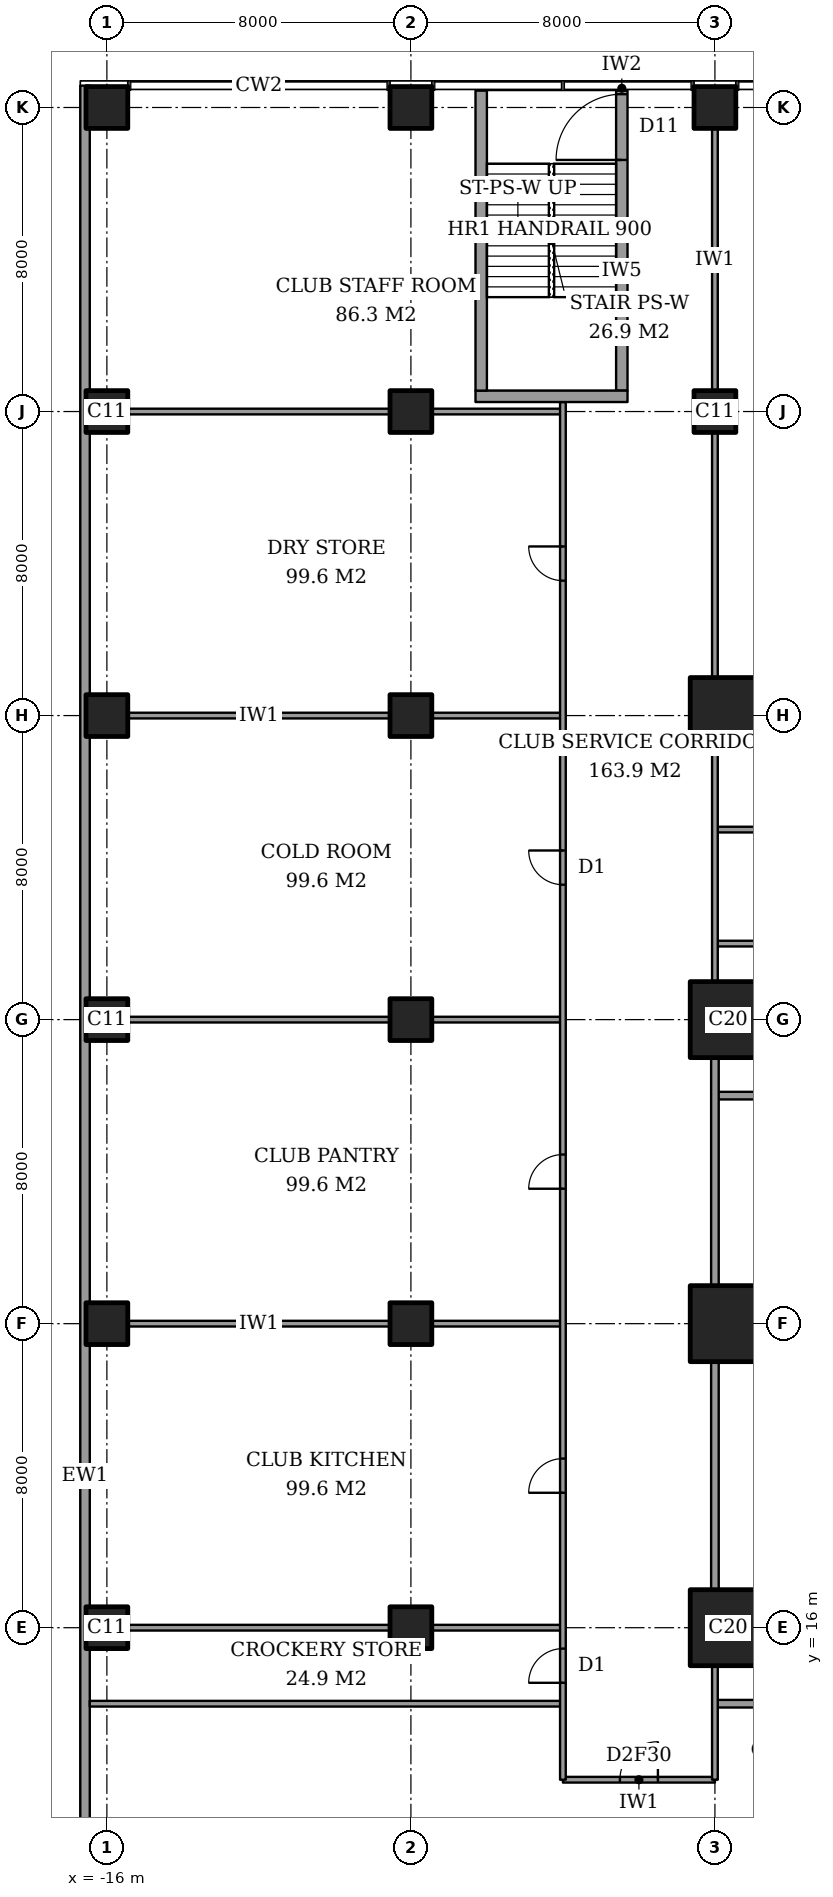
"""IFC4 building model, lengths in metres.
Left out: names, types, materials, properties, quantities, classifications, styles, units other than length and angle.
Written with IfcOpenShell. Run it as: python <this file> out.ifc"""

import sys

from ifc_helpers import new_model, si_unit, direction, frame, frame_2d, origin, origin_2d, place, context, subcontext, project, spatial, rectangle, extrude, element, fill, save


model = new_model("IFC4")
c1 = context("Model", 3, precision=1e-05, world=origin(), true_north=direction((0.0, 1.0)))
c2 = subcontext(c1, "Body", "Model", "MODEL_VIEW")
j1 = project(units=[si_unit("LENGTHUNIT", "METRE"), si_unit("PLANEANGLEUNIT", "RADIAN")], contexts=[c1])
p1 = place(None, origin())
s1 = spatial("IfcSite", under=j1, at=p1, CompositionType="ELEMENT")
p2 = place(p1, origin())
s2 = spatial("IfcBuilding", under=s1, at=p2, CompositionType="ELEMENT")
p3 = place(p2, frame((0.0, 0.0, 6.0)))
s3 = spatial("IfcBuildingStorey", under=s2, at=p3, CompositionType="ELEMENT", Elevation=6.0)
for number, where, z_axis, x_axis in (
    (1, (-16.0, 16.0, 0.0), (0.0, 0.0, 1.0), (1.0, 0.0, 0.0)),
    (2, (-16.0, 24.0, 0.0), (0.0, 0.0, 1.0), (1.0, 0.0, 0.0)),
    (3, (-16.0, 32.0, 0.0), (0.0, 0.0, 1.0), (1.0, 0.0, 0.0)),
    (4, (-16.0, 40.0, 0.0), (0.0, 0.0, 1.0), (1.0, 0.0, 0.0)),
    (5, (-16.0, 48.0, 0.0), (0.0, 0.0, 1.0), (1.0, 0.0, 0.0)),
    (6, (-16.0, 56.0, 0.0), (0.0, 0.0, 1.0), (1.0, 0.0, 0.0)),
    (7, (-8.0, 16.0, 0.0), (0.0, 0.0, 1.0), (1.0, 0.0, 0.0)),
    (8, (-8.0, 24.0, 0.0), (0.0, 0.0, 1.0), (1.0, 0.0, 0.0)),
    (9, (-8.0, 32.0, 0.0), (0.0, 0.0, 1.0), (1.0, 0.0, 0.0)),
    (10, (-8.0, 40.0, 0.0), (0.0, 0.0, 1.0), (1.0, 0.0, 0.0)),
    (11, (-8.0, 48.0, 0.0), (0.0, 0.0, 1.0), (1.0, 0.0, 0.0)),
    (12, (-8.0, 56.0, 0.0), (0.0, 0.0, 1.0), (1.0, 0.0, 0.0)),
):
    element("IfcColumn", number, at=place(p3, frame(where, z_axis=z_axis, x_axis=x_axis)), inside=s3, PredefinedType="COLUMN", context=c2, shape_type="SweptSolid", body=[
        extrude(rectangle(XDim=1.1, YDim=1.1, at=origin_2d()), origin(), (0.0, 0.0, 1.0), 5.0),
    ])
for number, where, z_axis, x_axis in (
    (13, (0.35, 16.0, 0.0), (0.0, 0.0, 1.0), (1.0, 0.0, 0.0)),
    (14, (0.35, 24.0, 0.0), (0.0, 0.0, 1.0), (1.0, 0.0, 0.0)),
    (15, (0.35, 32.0, 0.0), (0.0, 0.0, 1.0), (1.0, 0.0, 0.0)),
    (16, (0.35, 40.0, 0.0), (0.0, 0.0, 1.0), (1.0, 0.0, 0.0)),
):
    element("IfcColumn", number, at=place(p3, frame(where, z_axis=z_axis, x_axis=x_axis)), inside=s3, PredefinedType="COLUMN", context=c2, shape_type="SweptSolid", body=[
        extrude(rectangle(XDim=2.0, YDim=2.0, at=origin_2d()), origin(), (0.0, 0.0, 1.0), 5.0),
    ])
for number, where, z_axis, x_axis in (
    (17, (0.0, 48.0, 0.0), (0.0, 0.0, 1.0), (1.0, 0.0, 0.0)),
    (18, (0.0, 56.0, 0.0), (0.0, 0.0, 1.0), (1.0, 0.0, 0.0)),
):
    element("IfcColumn", number, at=place(p3, frame(where, z_axis=z_axis, x_axis=x_axis)), inside=s3, PredefinedType="COLUMN", context=c2, shape_type="SweptSolid", body=[
        extrude(rectangle(XDim=1.1, YDim=1.1, at=origin_2d()), origin(), (0.0, 0.0, 1.0), 5.0),
    ])
p4 = place(p3, frame((-16.575, 56.575, 0.0), z_axis=(0.0, 0.0, 1.0), x_axis=(0.0, -1.0, 0.0)))
e19 = element("IfcWall", 19, at=p4, inside=s3, PredefinedType="SOLIDWALL", context=c2, shape_type="SweptSolid", body=[
    extrude(rectangle(XDim=73.15, YDim=0.25, at=frame_2d((36.575, 0.0))), origin(), (0.0, 0.0, 1.0), 5.0),
])
p5 = place(p3, frame((-4.0, 12.0, 0.0), z_axis=(0.0, 0.0, 1.0), x_axis=(1.0, 0.0, 0.0)))
e20 = element("IfcWall", 20, at=p5, inside=s3, PredefinedType="PARTITIONING", context=c2, shape_type="SweptSolid", body=[
    extrude(rectangle(XDim=4.0, YDim=0.15, at=frame_2d((2.0, 0.0))), origin(), (0.0, 0.0, 1.0), 4.7),
])
p6 = place(p5, frame((1.5, 0.0, 0.0)))
e21 = element("IfcOpeningElement", 21, at=p6, cuts=e20, PredefinedType="OPENING", context=c2, shape_type="SweptSolid", body=[
    extrude(rectangle(XDim=1.0, YDim=2.1, at=frame_2d((0.5, 1.05))), frame((0.0, 0.085, 0.0), z_axis=(0.0, -1.0, 0.0), x_axis=(1.0, 0.0, 0.0)), (0.0, 0.0, 1.0), 0.17),
])
p7 = place(p3, frame((0.0, 14.0, 0.0), z_axis=(0.0, 0.0, 1.0), x_axis=(1.0, 0.0, 0.0)))
e22 = element("IfcWall", 22, at=p7, inside=s3, PredefinedType="PARTITIONING", context=c2, shape_type="SweptSolid", body=[
    extrude(rectangle(XDim=6.5, YDim=0.2, at=frame_2d((3.25, 0.0))), origin(), (0.0, 0.0, 1.0), 4.7),
])
p8 = place(p3, frame((-16.45, 14.0, 0.0), z_axis=(0.0, 0.0, 1.0), x_axis=(1.0, 0.0, 0.0)))
e23 = element("IfcWall", 23, at=p8, inside=s3, PredefinedType="PARTITIONING", context=c2, shape_type="SweptSolid", body=[
    extrude(rectangle(XDim=12.45, YDim=0.15, at=frame_2d((6.225, 0.0))), origin(), (0.0, 0.0, 1.0), 4.7),
])
p9 = place(p3, frame((-15.45, 16.0, 0.0), z_axis=(0.0, 0.0, 1.0), x_axis=(1.0, 0.0, 0.0)))
e24 = element("IfcWall", 24, at=p9, inside=s3, PredefinedType="PARTITIONING", context=c2, shape_type="SweptSolid", body=[
    extrude(rectangle(XDim=6.9, YDim=0.15, at=frame_2d((3.45, 0.0))), origin(), (0.0, 0.0, 1.0), 3.3),
])
p10 = place(p3, frame((-7.45, 16.0, 0.0), z_axis=(0.0, 0.0, 1.0), x_axis=(1.0, 0.0, 0.0)))
e25 = element("IfcWall", 25, at=p10, inside=s3, PredefinedType="PARTITIONING", context=c2, shape_type="SweptSolid", body=[
    extrude(rectangle(XDim=3.45, YDim=0.15, at=frame_2d((1.725, 0.0))), origin(), (0.0, 0.0, 1.0), 3.3),
])
p11 = place(p3, frame((-15.45, 24.0, 0.0), z_axis=(0.0, 0.0, 1.0), x_axis=(1.0, 0.0, 0.0)))
e26 = element("IfcWall", 26, at=p11, inside=s3, PredefinedType="PARTITIONING", context=c2, shape_type="SweptSolid", body=[
    extrude(rectangle(XDim=6.9, YDim=0.15, at=frame_2d((3.45, 0.0))), origin(), (0.0, 0.0, 1.0), 3.3),
])
p12 = place(p3, frame((-7.45, 24.0, 0.0), z_axis=(0.0, 0.0, 1.0), x_axis=(1.0, 0.0, 0.0)))
e27 = element("IfcWall", 27, at=p12, inside=s3, PredefinedType="PARTITIONING", context=c2, shape_type="SweptSolid", body=[
    extrude(rectangle(XDim=3.45, YDim=0.15, at=frame_2d((1.725, 0.0))), origin(), (0.0, 0.0, 1.0), 3.3),
])
p13 = place(p3, frame((0.0, 30.0, 0.0), z_axis=(0.0, 0.0, 1.0), x_axis=(1.0, 0.0, 0.0)))
e28 = element("IfcWall", 28, at=p13, inside=s3, PredefinedType="PARTITIONING", context=c2, shape_type="SweptSolid", body=[
    extrude(rectangle(XDim=6.0, YDim=0.2, at=frame_2d((3.0, 0.0))), origin(), (0.0, 0.0, 1.0), 4.7),
])
p14 = place(p3, frame((-15.45, 32.0, 0.0), z_axis=(0.0, 0.0, 1.0), x_axis=(1.0, 0.0, 0.0)))
e29 = element("IfcWall", 29, at=p14, inside=s3, PredefinedType="PARTITIONING", context=c2, shape_type="SweptSolid", body=[
    extrude(rectangle(XDim=6.9, YDim=0.15, at=frame_2d((3.45, 0.0))), origin(), (0.0, 0.0, 1.0), 3.3),
])
p15 = place(p3, frame((-7.45, 32.0, 0.0), z_axis=(0.0, 0.0, 1.0), x_axis=(1.0, 0.0, 0.0)))
e30 = element("IfcWall", 30, at=p15, inside=s3, PredefinedType="PARTITIONING", context=c2, shape_type="SweptSolid", body=[
    extrude(rectangle(XDim=3.45, YDim=0.15, at=frame_2d((1.725, 0.0))), origin(), (0.0, 0.0, 1.0), 3.3),
])
p16 = place(p3, frame((0.0, 34.0, 0.0), z_axis=(0.0, 0.0, 1.0), x_axis=(1.0, 0.0, 0.0)))
e31 = element("IfcWall", 31, at=p16, inside=s3, PredefinedType="PARTITIONING", context=c2, shape_type="SweptSolid", body=[
    extrude(rectangle(XDim=24.0, YDim=0.15, at=frame_2d((12.0, 0.0))), origin(), (0.0, 0.0, 1.0), 4.7),
])
p17 = place(p16, frame((11.95, 0.0, 0.0)))
e32 = element("IfcOpeningElement", 32, at=p17, cuts=e31, PredefinedType="OPENING", context=c2, shape_type="SweptSolid", body=[
    extrude(rectangle(XDim=1.0, YDim=2.1, at=frame_2d((0.5, 1.05))), frame((0.0, 0.085, 0.0), z_axis=(0.0, -1.0, 0.0), x_axis=(1.0, 0.0, 0.0)), (0.0, 0.0, 1.0), 0.17),
])
p18 = place(p16, frame((2.55, 0.0, 0.0)))
e33 = element("IfcOpeningElement", 33, at=p18, cuts=e31, PredefinedType="OPENING", context=c2, shape_type="SweptSolid", body=[
    extrude(rectangle(XDim=0.9, YDim=2.1, at=frame_2d((0.45, 1.05))), frame((0.0, 0.085, 0.0), z_axis=(0.0, -1.0, 0.0), x_axis=(1.0, 0.0, 0.0)), (0.0, 0.0, 1.0), 0.17),
])
p19 = place(p3, frame((0.0, 37.0, 0.0), z_axis=(0.0, 0.0, 1.0), x_axis=(1.0, 0.0, 0.0)))
e34 = element("IfcWall", 34, at=p19, inside=s3, PredefinedType="PARTITIONING", context=c2, shape_type="SweptSolid", body=[
    extrude(rectangle(XDim=24.45, YDim=0.15, at=frame_2d((12.225, 0.0))), origin(), (0.0, 0.0, 1.0), 4.7),
])
p20 = place(p19, frame((4.1, 0.0, 0.0)))
e35 = element("IfcOpeningElement", 35, at=p20, cuts=e34, PredefinedType="OPENING", context=c2, shape_type="SweptSolid", body=[
    extrude(rectangle(XDim=1.8, YDim=2.1, at=frame_2d((0.9, 1.05))), frame((0.0, 0.085, 0.0), z_axis=(0.0, -1.0, 0.0), x_axis=(1.0, 0.0, 0.0)), (0.0, 0.0, 1.0), 0.17),
])
p21 = place(p19, frame((12.6, 0.0, 0.0)))
e36 = element("IfcOpeningElement", 36, at=p21, cuts=e34, PredefinedType="OPENING", context=c2, shape_type="SweptSolid", body=[
    extrude(rectangle(XDim=1.8, YDim=2.1, at=frame_2d((0.9, 1.05))), frame((0.0, 0.085, 0.0), z_axis=(0.0, -1.0, 0.0), x_axis=(1.0, 0.0, 0.0)), (0.0, 0.0, 1.0), 0.17),
])
p22 = place(p19, frame((18.825, 0.0, 0.0)))
e37 = element("IfcOpeningElement", 37, at=p22, cuts=e34, PredefinedType="OPENING", context=c2, shape_type="SweptSolid", body=[
    extrude(rectangle(XDim=1.8, YDim=2.1, at=frame_2d((0.9, 1.05))), frame((0.0, 0.085, 0.0), z_axis=(0.0, -1.0, 0.0), x_axis=(1.0, 0.0, 0.0)), (0.0, 0.0, 1.0), 0.17),
])
p23 = place(p3, frame((-15.45, 40.0, 0.0), z_axis=(0.0, 0.0, 1.0), x_axis=(1.0, 0.0, 0.0)))
e38 = element("IfcWall", 38, at=p23, inside=s3, PredefinedType="PARTITIONING", context=c2, shape_type="SweptSolid", body=[
    extrude(rectangle(XDim=6.9, YDim=0.15, at=frame_2d((3.45, 0.0))), origin(), (0.0, 0.0, 1.0), 3.3),
])
p24 = place(p3, frame((-7.45, 40.0, 0.0), z_axis=(0.0, 0.0, 1.0), x_axis=(1.0, 0.0, 0.0)))
e39 = element("IfcWall", 39, at=p24, inside=s3, PredefinedType="PARTITIONING", context=c2, shape_type="SweptSolid", body=[
    extrude(rectangle(XDim=3.45, YDim=0.15, at=frame_2d((1.725, 0.0))), origin(), (0.0, 0.0, 1.0), 3.3),
])
p25 = place(p3, frame((-15.45, 48.0, 0.0), z_axis=(0.0, 0.0, 1.0), x_axis=(1.0, 0.0, 0.0)))
e40 = element("IfcWall", 40, at=p25, inside=s3, PredefinedType="PARTITIONING", context=c2, shape_type="SweptSolid", body=[
    extrude(rectangle(XDim=6.9, YDim=0.15, at=frame_2d((3.45, 0.0))), origin(), (0.0, 0.0, 1.0), 3.3),
])
p26 = place(p3, frame((-7.45, 48.0, 0.0), z_axis=(0.0, 0.0, 1.0), x_axis=(1.0, 0.0, 0.0)))
e41 = element("IfcWall", 41, at=p26, inside=s3, PredefinedType="PARTITIONING", context=c2, shape_type="SweptSolid", body=[
    extrude(rectangle(XDim=3.45, YDim=0.15, at=frame_2d((1.725, 0.0))), origin(), (0.0, 0.0, 1.0), 4.7),
])
p27 = place(p3, frame((-4.0, 12.0, 0.0), z_axis=(0.0, 0.0, 1.0), x_axis=(0.0, 1.0, 0.0)))
e42 = element("IfcWall", 42, at=p27, inside=s3, PredefinedType="PARTITIONING", context=c2, shape_type="SweptSolid", body=[
    extrude(rectangle(XDim=36.25, YDim=0.15, at=frame_2d((18.125, 0.0))), origin(), (0.0, 0.0, 1.0), 4.7),
])
p28 = place(p27, frame((2.55, 0.0, 0.0)))
e43 = element("IfcOpeningElement", 43, at=p28, cuts=e42, PredefinedType="OPENING", context=c2, shape_type="SweptSolid", body=[
    extrude(rectangle(XDim=0.9, YDim=2.1, at=frame_2d((0.45, 1.05))), frame((0.0, 0.085, 0.0), z_axis=(0.0, -1.0, 0.0), x_axis=(1.0, 0.0, 0.0)), (0.0, 0.0, 1.0), 0.17),
])
p29 = place(p27, frame((7.55, 0.0, 0.0)))
e44 = element("IfcOpeningElement", 44, at=p29, cuts=e42, PredefinedType="OPENING", context=c2, shape_type="SweptSolid", body=[
    extrude(rectangle(XDim=0.9, YDim=2.1, at=frame_2d((0.45, 1.05))), frame((0.0, 0.085, 0.0), z_axis=(0.0, -1.0, 0.0), x_axis=(1.0, 0.0, 0.0)), (0.0, 0.0, 1.0), 0.17),
])
p30 = place(p27, frame((15.55, 0.0, 0.0)))
e45 = element("IfcOpeningElement", 45, at=p30, cuts=e42, PredefinedType="OPENING", context=c2, shape_type="SweptSolid", body=[
    extrude(rectangle(XDim=0.9, YDim=2.1, at=frame_2d((0.45, 1.05))), frame((0.0, 0.085, 0.0), z_axis=(0.0, -1.0, 0.0), x_axis=(1.0, 0.0, 0.0)), (0.0, 0.0, 1.0), 0.17),
])
p31 = place(p27, frame((23.55, 0.0, 0.0)))
e46 = element("IfcOpeningElement", 46, at=p31, cuts=e42, PredefinedType="OPENING", context=c2, shape_type="SweptSolid", body=[
    extrude(rectangle(XDim=0.9, YDim=2.1, at=frame_2d((0.45, 1.05))), frame((0.0, 0.085, 0.0), z_axis=(0.0, -1.0, 0.0), x_axis=(1.0, 0.0, 0.0)), (0.0, 0.0, 1.0), 0.17),
])
p32 = place(p27, frame((31.55, 0.0, 0.0)))
e47 = element("IfcOpeningElement", 47, at=p32, cuts=e42, PredefinedType="OPENING", context=c2, shape_type="SweptSolid", body=[
    extrude(rectangle(XDim=0.9, YDim=2.1, at=frame_2d((0.45, 1.05))), frame((0.0, 0.085, 0.0), z_axis=(0.0, -1.0, 0.0), x_axis=(1.0, 0.0, 0.0)), (0.0, 0.0, 1.0), 0.17),
])
for number, where, z_axis, x_axis in (
    (48, (0.0, 17.0, 0.0), (0.0, 0.0, 1.0), (0.0, 1.0, 0.0)),
    (49, (0.0, 25.0, 0.0), (0.0, 0.0, 1.0), (0.0, 1.0, 0.0)),
):
    element("IfcWall", number, at=place(p3, frame(where, z_axis=z_axis, x_axis=x_axis)), inside=s3, PredefinedType="PARTITIONING", context=c2, shape_type="SweptSolid", body=[
        extrude(rectangle(XDim=6.0, YDim=0.2, at=frame_2d((3.0, 0.0))), origin(), (0.0, 0.0, 1.0), 3.3),
    ])
p33 = place(p3, frame((0.0, 12.0, 0.0), z_axis=(0.0, 0.0, 1.0), x_axis=(0.0, 1.0, 0.0)))
e50 = element("IfcWall", 50, at=p33, inside=s3, PredefinedType="PARTITIONING", context=c2, shape_type="SweptSolid", body=[
    extrude(rectangle(XDim=3.0, YDim=0.15, at=frame_2d((1.5, 0.0))), origin(), (0.0, 0.0, 1.0), 3.3),
])
p34 = place(p3, frame((0.0, 33.0, 0.0), z_axis=(0.0, 0.0, 1.0), x_axis=(0.0, 1.0, 0.0)))
e51 = element("IfcWall", 51, at=p34, inside=s3, PredefinedType="PARTITIONING", context=c2, shape_type="SweptSolid", body=[
    extrude(rectangle(XDim=6.0, YDim=0.15, at=frame_2d((3.0, 0.0))), origin(), (0.0, 0.0, 1.0), 3.3),
])
p35 = place(p3, frame((0.0, 41.0, 0.0), z_axis=(0.0, 0.0, 1.0), x_axis=(0.0, 1.0, 0.0)))
e52 = element("IfcWall", 52, at=p35, inside=s3, PredefinedType="PARTITIONING", context=c2, shape_type="SweptSolid", body=[
    extrude(rectangle(XDim=6.45, YDim=0.15, at=frame_2d((3.225, 0.0))), origin(), (0.0, 0.0, 1.0), 3.3),
])
p36 = place(p3, frame((0.0, 48.55, 0.0), z_axis=(0.0, 0.0, 1.0), x_axis=(0.0, 1.0, 0.0)))
e53 = element("IfcWall", 53, at=p36, inside=s3, PredefinedType="PARTITIONING", context=c2, shape_type="SweptSolid", body=[
    extrude(rectangle(XDim=6.9, YDim=0.15, at=frame_2d((3.45, 0.0))), origin(), (0.0, 0.0, 1.0), 3.3),
])
p37 = place(p3, frame((-6.3, 48.4, 0.0), z_axis=(0.0, 0.0, 1.0), x_axis=(1.0, 0.0, 0.0)))
e54 = element("IfcWall", 54, at=p37, inside=s3, PredefinedType="PARTITIONING", context=c2, shape_type="SweptSolid", body=[
    extrude(rectangle(XDim=4.0, YDim=0.3, at=frame_2d((2.0, 0.0))), origin(), (0.0, 0.0, 1.0), 5.0),
])
p38 = place(p3, frame((-6.15, 48.55, 0.0), z_axis=(0.0, 0.0, 1.0), x_axis=(0.0, 1.0, 0.0)))
e55 = element("IfcWall", 55, at=p38, inside=s3, PredefinedType="PARTITIONING", context=c2, shape_type="SweptSolid", body=[
    extrude(rectangle(XDim=7.9, YDim=0.3, at=frame_2d((3.95, 0.0))), origin(), (0.0, 0.0, 1.0), 5.0),
])
p39 = place(p3, frame((-2.45, 48.55, 0.0), z_axis=(0.0, 0.0, 1.0), x_axis=(0.0, 1.0, 0.0)))
e56 = element("IfcWall", 56, at=p39, inside=s3, PredefinedType="PARTITIONING", context=c2, shape_type="SweptSolid", body=[
    extrude(rectangle(XDim=7.9, YDim=0.3, at=frame_2d((3.95, 0.0))), origin(), (0.0, 0.0, 1.0), 5.0),
])
p40 = place(p39, frame((6.07, 0.0, 0.0)))
e57 = element("IfcOpeningElement", 57, at=p40, cuts=e56, PredefinedType="OPENING", context=c2, shape_type="SweptSolid", body=[
    extrude(rectangle(XDim=1.73, YDim=2.1, at=frame_2d((0.865, 1.05))), frame((0.0, 0.16, 0.0), z_axis=(0.0, -1.0, 0.0), x_axis=(1.0, 0.0, 0.0)), (0.0, 0.0, 1.0), 0.32),
])
for number, where, z_axis, x_axis in (
    (58, (-6.15, 56.45, 0.0), (0.0, 0.0, 1.0), (0.0, 1.0, 0.0)),
    (59, (-2.45, 56.45, 0.0), (0.0, 0.0, 1.0), (0.0, 1.0, 0.0)),
):
    element("IfcWall", number, at=place(p3, frame(where, z_axis=z_axis, x_axis=x_axis)), inside=s3, PredefinedType="PARTITIONING", context=c2, shape_type="SweptSolid", body=[
        extrude(rectangle(XDim=0.111, YDim=0.2, at=frame_2d((0.056, 0.0))), origin(), (0.0, 0.0, 1.0), 5.0),
    ])
p41 = place(p6, origin())
e60 = element("IfcDoor", 60, at=p41, inside=s3, OperationType="SINGLE_SWING_LEFT", PredefinedType="DOOR", context=c2, shape_type="SweptSolid", body=[
    extrude(rectangle(XDim=1.0, YDim=2.1, at=frame_2d((0.5, 1.05))), frame((0.0, 0.025, 0.0), z_axis=(0.0, -1.0, 0.0), x_axis=(1.0, 0.0, 0.0)), (0.0, 0.0, 1.0), 0.05),
])
fill(e21, e60)
p42 = place(p28, origin())
e61 = element("IfcDoor", 61, at=p42, inside=s3, OperationType="SINGLE_SWING_RIGHT", PredefinedType="DOOR", context=c2, shape_type="SweptSolid", body=[
    extrude(rectangle(XDim=0.9, YDim=2.1, at=frame_2d((0.45, 1.05))), frame((0.0, 0.025, 0.0), z_axis=(0.0, -1.0, 0.0), x_axis=(1.0, 0.0, 0.0)), (0.0, 0.0, 1.0), 0.05),
])
fill(e43, e61)
p43 = place(p29, origin())
e62 = element("IfcDoor", 62, at=p43, inside=s3, OperationType="SINGLE_SWING_RIGHT", PredefinedType="DOOR", context=c2, shape_type="SweptSolid", body=[
    extrude(rectangle(XDim=0.9, YDim=2.1, at=frame_2d((0.45, 1.05))), frame((0.0, 0.025, 0.0), z_axis=(0.0, -1.0, 0.0), x_axis=(1.0, 0.0, 0.0)), (0.0, 0.0, 1.0), 0.05),
])
fill(e44, e62)
p44 = place(p30, origin())
e63 = element("IfcDoor", 63, at=p44, inside=s3, OperationType="SINGLE_SWING_RIGHT", PredefinedType="DOOR", context=c2, shape_type="SweptSolid", body=[
    extrude(rectangle(XDim=0.9, YDim=2.1, at=frame_2d((0.45, 1.05))), frame((0.0, 0.025, 0.0), z_axis=(0.0, -1.0, 0.0), x_axis=(1.0, 0.0, 0.0)), (0.0, 0.0, 1.0), 0.05),
])
fill(e45, e63)
p45 = place(p31, origin())
e64 = element("IfcDoor", 64, at=p45, inside=s3, OperationType="SINGLE_SWING_LEFT", PredefinedType="DOOR", context=c2, shape_type="SweptSolid", body=[
    extrude(rectangle(XDim=0.9, YDim=2.1, at=frame_2d((0.45, 1.05))), frame((0.0, 0.025, 0.0), z_axis=(0.0, -1.0, 0.0), x_axis=(1.0, 0.0, 0.0)), (0.0, 0.0, 1.0), 0.05),
])
fill(e46, e64)
p46 = place(p32, origin())
e65 = element("IfcDoor", 65, at=p46, inside=s3, OperationType="SINGLE_SWING_LEFT", PredefinedType="DOOR", context=c2, shape_type="SweptSolid", body=[
    extrude(rectangle(XDim=0.9, YDim=2.1, at=frame_2d((0.45, 1.05))), frame((0.0, 0.025, 0.0), z_axis=(0.0, -1.0, 0.0), x_axis=(1.0, 0.0, 0.0)), (0.0, 0.0, 1.0), 0.05),
])
fill(e47, e65)
p47 = place(p40, origin())
e66 = element("IfcDoor", 66, at=p47, inside=s3, OperationType="DOUBLE_DOOR_SINGLE_SWING", PredefinedType="DOOR", context=c2, shape_type="SweptSolid", body=[
    extrude(rectangle(XDim=1.73, YDim=2.1, at=frame_2d((0.865, 1.05))), frame((0.0, 0.025, 0.0), z_axis=(0.0, -1.0, 0.0), x_axis=(1.0, 0.0, 0.0)), (0.0, 0.0, 1.0), 0.05),
])
fill(e57, e66)
save(model, sys.argv[1])
